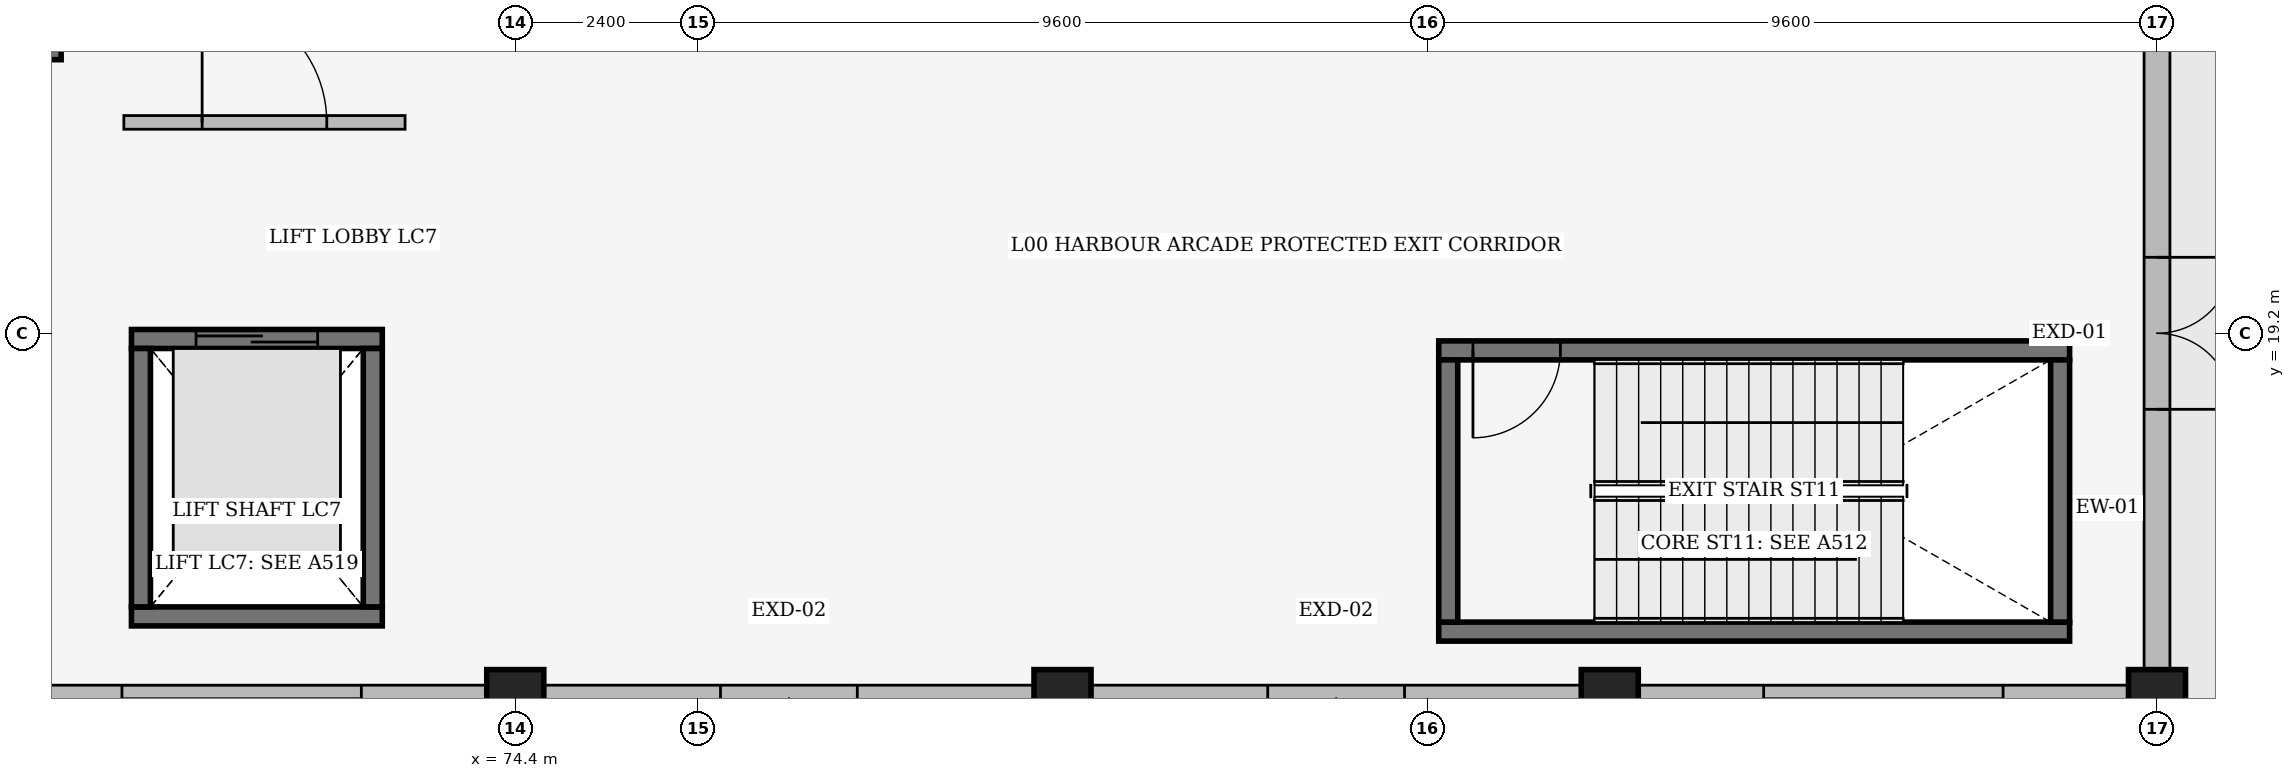
"""IFC4 building model, lengths in metres.
Left out: names, types, materials, properties, quantities, classifications, styles, units other than length and angle.
Written with IfcOpenShell. Run it as: python <this file> out.ifc"""

import sys

from ifc_helpers import new_model, si_unit, direction, frame, frame_2d, origin, origin_2d, place, context, subcontext, project, spatial, rectangle, extrude, element, fill, save


model = new_model("IFC4")
c1 = context("Model", 3, precision=1e-05, world=origin(), true_north=direction((0.0, 1.0)))
c2 = subcontext(c1, "Body", "Model", "MODEL_VIEW")
j1 = project(units=[si_unit("LENGTHUNIT", "METRE"), si_unit("PLANEANGLEUNIT", "RADIAN")], contexts=[c1])
p1 = place(None, origin())
s1 = spatial("IfcSite", under=j1, at=p1, CompositionType="ELEMENT")
p2 = place(p1, origin())
s2 = spatial("IfcBuilding", under=s1, at=p2, CompositionType="ELEMENT")
p3 = place(p2, origin())
s3 = spatial("IfcBuildingStorey", under=s2, at=p3, CompositionType="ELEMENT", Elevation=0.0)
p4 = place(p3, frame((74.4, 14.4, 0.0), z_axis=(0.0, 0.0, 1.0), x_axis=(1.0, 0.0, 0.0)))
e1 = element("IfcColumn", 1, at=p4, inside=s3, PredefinedType="COLUMN", context=c2, shape_type="SweptSolid", body=[
    extrude(rectangle(XDim=0.75, YDim=0.75, at=origin_2d()), origin(), (0.0, 0.0, 1.0), 5.4),
])
p5 = place(p3, frame((81.6, 14.4, -0.3), z_axis=(0.0, 0.0, 1.0), x_axis=(1.0, 0.0, 0.0)))
e2 = element("IfcColumn", 2, at=p5, inside=s3, PredefinedType="COLUMN", context=c2, shape_type="SweptSolid", body=[
    extrude(rectangle(XDim=0.75, YDim=0.75, at=origin_2d()), origin(), (0.0, 0.0, 1.0), 5.7),
])
for number, where, z_axis, x_axis in (
    (3, (88.8, 14.4, 0.0), (0.0, 0.0, 1.0), (1.0, 0.0, 0.0)),
    (4, (96.0, 14.4, 0.0), (0.0, 0.0, 1.0), (1.0, 0.0, 0.0)),
):
    element("IfcColumn", number, at=place(p3, frame(where, z_axis=z_axis, x_axis=x_axis)), inside=s3, PredefinedType="COLUMN", context=c2, shape_type="SweptSolid", body=[
        extrude(rectangle(XDim=0.75, YDim=0.75, at=origin_2d()), origin(), (0.0, 0.0, 1.0), 5.4),
    ])
p6 = place(p3, frame((68.2, 22.8, 0.0), z_axis=(0.0, 0.0, 1.0), x_axis=(0.0, 1.0, 0.0)))
e5 = element("IfcWall", 5, at=p6, inside=s3, PredefinedType="SHEAR", context=c2, shape_type="SweptSolid", body=[
    extrude(rectangle(XDim=6.0, YDim=0.45, at=frame_2d((3.0, 0.0))), origin(), (0.0, 0.0, 1.0), 5.4),
])
p7 = place(p3, frame((96.0, 14.783, 0.0), z_axis=(0.0, 0.0, 1.0), x_axis=(0.0, 1.0, 0.0)))
e6 = element("IfcWall", 6, at=p7, inside=s3, PredefinedType="SOLIDWALL", context=c2, shape_type="SweptSolid", body=[
    extrude(rectangle(XDim=8.834, YDim=0.34, at=frame_2d((4.417, 0.0))), origin(), (0.0, 0.0, 1.0), 4.766),
])
p8 = place(p7, frame((5.417, 0.0, 0.0), z_axis=(0.0, 0.0, 1.0), x_axis=(-1.0, 0.0, 0.0)))
e7 = element("IfcOpeningElement", 7, at=p8, cuts=e6, PredefinedType="OPENING", context=c2, shape_type="SweptSolid", body=[
    extrude(rectangle(XDim=2.0, YDim=2.5, at=frame_2d((1.0, 1.25))), frame((0.0, 0.18, 0.0), z_axis=(0.0, -1.0, 0.0), x_axis=(1.0, 0.0, 0.0)), (0.0, 0.0, 1.0), 0.36),
])
p9 = place(p3, frame((67.583, 14.4, 0.0), z_axis=(0.0, 0.0, 1.0), x_axis=(1.0, 0.0, 0.0)))
e8 = element("IfcWall", 8, at=p9, inside=s3, PredefinedType="SOLIDWALL", context=c2, shape_type="SweptSolid", body=[
    extrude(rectangle(XDim=6.434, YDim=0.34, at=frame_2d((3.217, 0.0))), origin(), (0.0, 0.0, 1.0), 4.758),
])
p10 = place(p9, frame((1.642, 0.0, 0.95)))
e9 = element("IfcOpeningElement", 9, at=p10, cuts=e8, PredefinedType="OPENING", context=c2, shape_type="SweptSolid", body=[
    extrude(rectangle(XDim=3.15, YDim=1.5, at=frame_2d((1.575, 0.75))), frame((0.0, 0.18, 0.0), z_axis=(0.0, -1.0, 0.0), x_axis=(1.0, 0.0, 0.0)), (0.0, 0.0, 1.0), 0.36),
])
p11 = place(p3, frame((74.783, 14.4, 0.0), z_axis=(0.0, 0.0, 1.0), x_axis=(1.0, 0.0, 0.0)))
e10 = element("IfcWall", 10, at=p11, inside=s3, PredefinedType="SOLIDWALL", context=c2, shape_type="SweptSolid", body=[
    extrude(rectangle(XDim=6.434, YDim=0.34, at=frame_2d((3.217, 0.0))), origin(), (0.0, 0.0, 1.0), 4.863),
])
p12 = place(p11, frame((4.117, 0.0, 0.0), z_axis=(0.0, 0.0, 1.0), x_axis=(-1.0, 0.0, 0.0)))
e11 = element("IfcOpeningElement", 11, at=p12, cuts=e10, PredefinedType="OPENING", context=c2, shape_type="SweptSolid", body=[
    extrude(rectangle(XDim=1.8, YDim=2.4, at=frame_2d((0.9, 1.2))), frame((0.0, 0.18, 0.0), z_axis=(0.0, -1.0, 0.0), x_axis=(1.0, 0.0, 0.0)), (0.0, 0.0, 1.0), 0.36),
])
p13 = place(p3, frame((81.983, 14.4, 0.0), z_axis=(0.0, 0.0, 1.0), x_axis=(1.0, 0.0, 0.0)))
e12 = element("IfcWall", 12, at=p13, inside=s3, PredefinedType="SOLIDWALL", context=c2, shape_type="SweptSolid", body=[
    extrude(rectangle(XDim=6.434, YDim=0.34, at=frame_2d((3.217, 0.0))), origin(), (0.0, 0.0, 1.0), 4.758),
])
p14 = place(p13, frame((4.117, 0.0, 0.0), z_axis=(0.0, 0.0, 1.0), x_axis=(-1.0, 0.0, 0.0)))
e13 = element("IfcOpeningElement", 13, at=p14, cuts=e12, PredefinedType="OPENING", context=c2, shape_type="SweptSolid", body=[
    extrude(rectangle(XDim=1.8, YDim=2.4, at=frame_2d((0.9, 1.2))), frame((0.0, 0.18, 0.0), z_axis=(0.0, -1.0, 0.0), x_axis=(1.0, 0.0, 0.0)), (0.0, 0.0, 1.0), 0.36),
])
p15 = place(p3, frame((89.183, 14.4, 0.0), z_axis=(0.0, 0.0, 1.0), x_axis=(1.0, 0.0, 0.0)))
e14 = element("IfcWall", 14, at=p15, inside=s3, PredefinedType="SOLIDWALL", context=c2, shape_type="SweptSolid", body=[
    extrude(rectangle(XDim=6.434, YDim=0.34, at=frame_2d((3.217, 0.0))), origin(), (0.0, 0.0, 1.0), 4.863),
])
p16 = place(p15, frame((1.642, 0.0, 0.95)))
e15 = element("IfcOpeningElement", 15, at=p16, cuts=e14, PredefinedType="OPENING", context=c2, shape_type="SweptSolid", body=[
    extrude(rectangle(XDim=3.15, YDim=1.8, at=frame_2d((1.575, 0.9))), frame((0.0, 0.18, 0.0), z_axis=(0.0, -1.0, 0.0), x_axis=(1.0, 0.0, 0.0)), (0.0, 0.0, 1.0), 0.36),
])
p17 = place(p3, frame((86.55, 15.275, 0.0), z_axis=(0.0, 0.0, 1.0), x_axis=(1.0, 0.0, 0.0)))
e16 = element("IfcWall", 16, at=p17, inside=s3, PredefinedType="SHEAR", context=c2, shape_type="SweptSolid", body=[
    extrude(rectangle(XDim=8.3, YDim=0.25, at=frame_2d((4.15, 0.0))), origin(), (0.0, 0.0, 1.0), 5.1),
])
p18 = place(p3, frame((94.85, 18.975, 0.0), z_axis=(0.0, 0.0, 1.0), x_axis=(-1.0, 0.0, 0.0)))
e17 = element("IfcWall", 17, at=p18, inside=s3, PredefinedType="SHEAR", context=c2, shape_type="SweptSolid", body=[
    extrude(rectangle(XDim=8.3, YDim=0.25, at=frame_2d((4.15, 0.0))), origin(), (0.0, 0.0, 1.0), 5.1),
])
p19 = place(p18, frame((7.85, 0.0, 0.0), z_axis=(0.0, 0.0, 1.0), x_axis=(-1.0, 0.0, 0.0)))
e18 = element("IfcOpeningElement", 18, at=p19, cuts=e17, PredefinedType="OPENING", context=c2, shape_type="SweptSolid", body=[
    extrude(rectangle(XDim=1.15, YDim=2.2, at=frame_2d((0.575, 1.1))), frame((0.0, 0.135, 0.0), z_axis=(0.0, -1.0, 0.0), x_axis=(1.0, 0.0, 0.0)), (0.0, 0.0, 1.0), 0.27),
])
for number, where, z_axis, x_axis in (
    (19, (86.675, 18.85, 0.0), (0.0, 0.0, 1.0), (0.0, -1.0, 0.0)),
    (20, (94.725, 15.4, 0.0), (0.0, 0.0, 1.0), (0.0, 1.0, 0.0)),
):
    element("IfcWall", number, at=place(p3, frame(where, z_axis=z_axis, x_axis=x_axis)), inside=s3, PredefinedType="SHEAR", context=c2, shape_type="SweptSolid", body=[
        extrude(rectangle(XDim=3.45, YDim=0.25, at=frame_2d((1.725, 0.0))), origin(), (0.0, 0.0, 1.0), 5.1),
    ])
p20 = place(p3, frame((69.35, 15.475, 0.0), z_axis=(0.0, 0.0, 1.0), x_axis=(1.0, 0.0, 0.0)))
e21 = element("IfcWall", 21, at=p20, inside=s3, PredefinedType="SHEAR", context=c2, shape_type="SweptSolid", body=[
    extrude(rectangle(XDim=3.3, YDim=0.25, at=frame_2d((1.65, 0.0))), origin(), (0.0, 0.0, 1.0), 5.1),
])
p21 = place(p3, frame((69.35, 19.125, 0.0), z_axis=(0.0, 0.0, 1.0), x_axis=(1.0, 0.0, 0.0)))
e22 = element("IfcWall", 22, at=p21, inside=s3, PredefinedType="SHEAR", context=c2, shape_type="SweptSolid", body=[
    extrude(rectangle(XDim=3.3, YDim=0.25, at=frame_2d((1.65, 0.0))), origin(), (0.0, 0.0, 1.0), 5.1),
])
p22 = place(p21, frame((0.85, 0.0, 0.0)))
e23 = element("IfcOpeningElement", 23, at=p22, cuts=e22, PredefinedType="OPENING", context=c2, shape_type="SweptSolid", body=[
    extrude(rectangle(XDim=1.6, YDim=2.3, at=frame_2d((0.8, 1.15))), frame((0.0, 0.135, 0.0), z_axis=(0.0, -1.0, 0.0), x_axis=(1.0, 0.0, 0.0)), (0.0, 0.0, 1.0), 0.27),
])
for number, where, z_axis, x_axis in (
    (24, (69.475, 15.6, 0.0), (0.0, 0.0, 1.0), (0.0, 1.0, 0.0)),
    (25, (72.525, 15.6, 0.0), (0.0, 0.0, 1.0), (0.0, 1.0, 0.0)),
):
    element("IfcWall", number, at=place(p3, frame(where, z_axis=z_axis, x_axis=x_axis)), inside=s3, PredefinedType="SHEAR", context=c2, shape_type="SweptSolid", body=[
        extrude(rectangle(XDim=3.4, YDim=0.25, at=frame_2d((1.7, 0.0))), origin(), (0.0, 0.0, 1.0), 5.1),
    ])
p23 = place(p3, frame((69.25, 21.975, 0.0), z_axis=(0.0, 0.0, 1.0), x_axis=(1.0, 0.0, 0.0)))
e26 = element("IfcWall", 26, at=p23, inside=s3, PredefinedType="PARTITIONING", context=c2, shape_type="SweptSolid", body=[
    extrude(rectangle(XDim=3.7, YDim=0.18, at=frame_2d((1.85, 0.0))), origin(), (0.0, 0.0, 1.0), 4.713),
])
p24 = place(p23, frame((1.03, 0.0, 0.0)))
e27 = element("IfcOpeningElement", 27, at=p24, cuts=e26, PredefinedType="OPENING", context=c2, shape_type="SweptSolid", body=[
    extrude(rectangle(XDim=1.64, YDim=2.35, at=frame_2d((0.82, 1.175))), frame((0.0, 0.1, 0.0), z_axis=(0.0, -1.0, 0.0), x_axis=(1.0, 0.0, 0.0)), (0.0, 0.0, 1.0), 0.2),
])
p25 = place(p8, origin())
e28 = element("IfcDoor", 28, at=p25, inside=s3, OperationType="DOUBLE_DOOR_SINGLE_SWING", PredefinedType="DOOR", context=c2, shape_type="SweptSolid", body=[
    extrude(rectangle(XDim=2.0, YDim=2.5, at=frame_2d((1.0, 1.25))), frame((0.0, 0.025, 0.0), z_axis=(0.0, -1.0, 0.0), x_axis=(1.0, 0.0, 0.0)), (0.0, 0.0, 1.0), 0.05),
])
fill(e7, e28)
p26 = place(p12, origin())
e29 = element("IfcDoor", 29, at=p26, inside=s3, OperationType="DOUBLE_DOOR_SINGLE_SWING", PredefinedType="DOOR", context=c2, shape_type="SweptSolid", body=[
    extrude(rectangle(XDim=1.8, YDim=2.4, at=frame_2d((0.9, 1.2))), frame((0.0, 0.025, 0.0), z_axis=(0.0, -1.0, 0.0), x_axis=(1.0, 0.0, 0.0)), (0.0, 0.0, 1.0), 0.05),
])
fill(e11, e29)
p27 = place(p14, origin())
e30 = element("IfcDoor", 30, at=p27, inside=s3, OperationType="DOUBLE_DOOR_SINGLE_SWING", PredefinedType="DOOR", context=c2, shape_type="SweptSolid", body=[
    extrude(rectangle(XDim=1.8, YDim=2.4, at=frame_2d((0.9, 1.2))), frame((0.0, 0.025, 0.0), z_axis=(0.0, -1.0, 0.0), x_axis=(1.0, 0.0, 0.0)), (0.0, 0.0, 1.0), 0.05),
])
fill(e13, e30)
p28 = place(p10, origin())
e31 = element("IfcWindow", 31, at=p28, inside=s3, PartitioningType="SINGLE_PANEL", PredefinedType="WINDOW", context=c2, shape_type="SweptSolid", body=[
    extrude(rectangle(XDim=3.15, YDim=1.5, at=frame_2d((1.575, 0.75))), frame((0.0, 0.03, 0.0), z_axis=(0.0, -1.0, 0.0), x_axis=(1.0, 0.0, 0.0)), (0.0, 0.0, 1.0), 0.06),
])
fill(e9, e31)
p29 = place(p16, origin())
e32 = element("IfcWindow", 32, at=p29, inside=s3, PartitioningType="SINGLE_PANEL", PredefinedType="WINDOW", context=c2, shape_type="SweptSolid", body=[
    extrude(rectangle(XDim=3.15, YDim=1.8, at=frame_2d((1.575, 0.9))), frame((0.0, 0.03, 0.0), z_axis=(0.0, -1.0, 0.0), x_axis=(1.0, 0.0, 0.0)), (0.0, 0.0, 1.0), 0.06),
])
fill(e15, e32)
p30 = place(p19, origin())
e33 = element("IfcDoor", 33, at=p30, inside=s3, OperationType="SINGLE_SWING_LEFT", PredefinedType="DOOR", context=c2, shape_type="SweptSolid", body=[
    extrude(rectangle(XDim=1.15, YDim=2.2, at=frame_2d((0.575, 1.1))), frame((0.0, 0.025, 0.0), z_axis=(0.0, -1.0, 0.0), x_axis=(1.0, 0.0, 0.0)), (0.0, 0.0, 1.0), 0.05),
])
fill(e18, e33)
p31 = place(p22, origin())
e34 = element("IfcDoor", 34, at=p31, inside=s3, OperationType="DOUBLE_DOOR_SLIDING", PredefinedType="DOOR", context=c2, shape_type="SweptSolid", body=[
    extrude(rectangle(XDim=1.6, YDim=2.3, at=frame_2d((0.8, 1.15))), frame((0.0, 0.025, 0.0), z_axis=(0.0, -1.0, 0.0), x_axis=(1.0, 0.0, 0.0)), (0.0, 0.0, 1.0), 0.05),
])
fill(e23, e34)
p32 = place(p24, origin())
e35 = element("IfcDoor", 35, at=p32, inside=s3, OperationType="SINGLE_SWING_LEFT", PredefinedType="DOOR", context=c2, shape_type="SweptSolid", body=[
    extrude(rectangle(XDim=1.64, YDim=2.35, at=frame_2d((0.82, 1.175))), frame((0.0, 0.025, 0.0), z_axis=(0.0, -1.0, 0.0), x_axis=(1.0, 0.0, 0.0)), (0.0, 0.0, 1.0), 0.05),
])
fill(e27, e35)
save(model, sys.argv[1])
